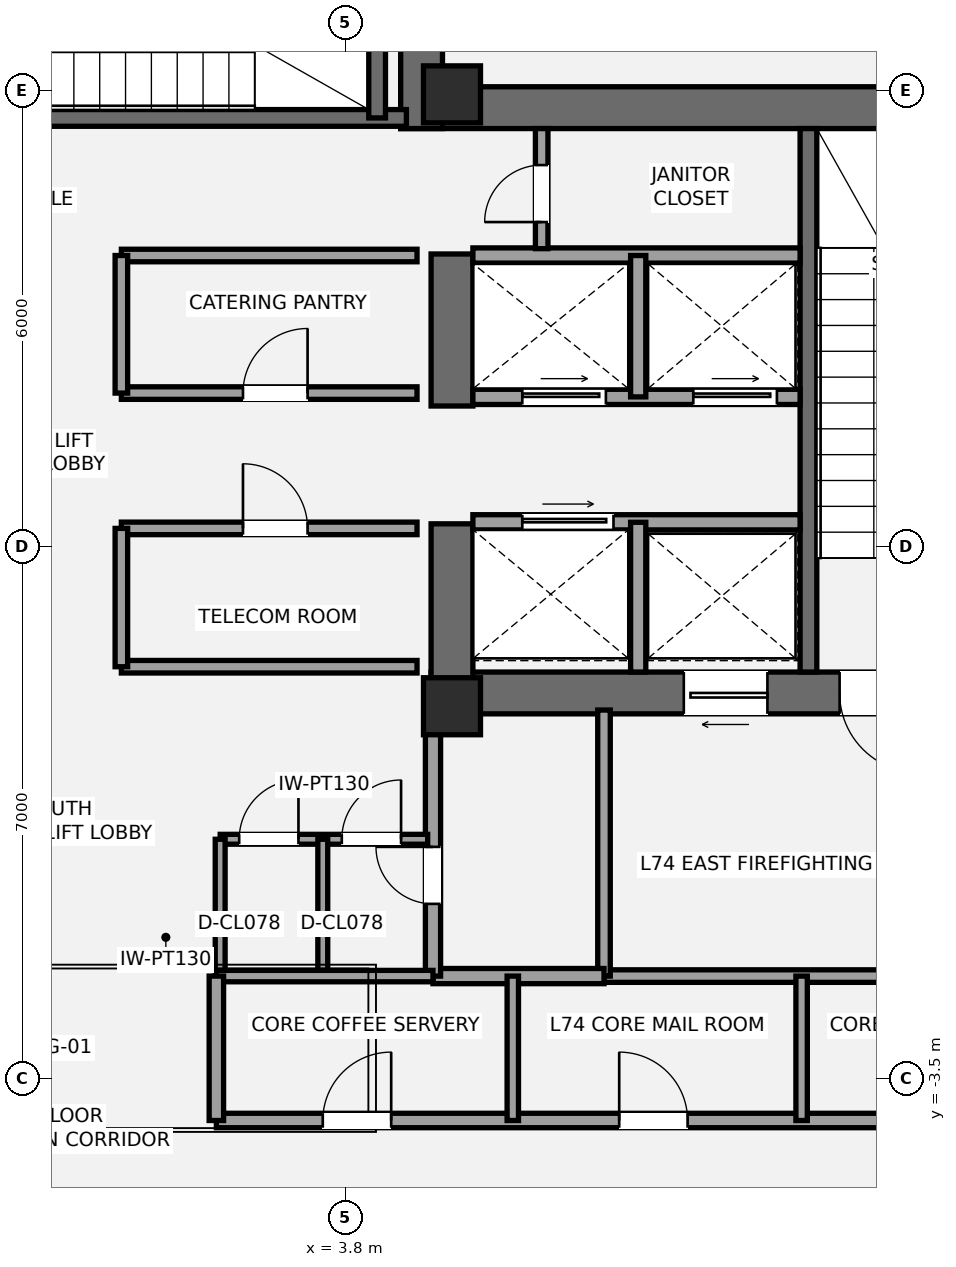
"""IFC4 building model, lengths in metres.
Left out: names, types, materials, properties, quantities, classifications, styles, units other than length and angle.
Written with IfcOpenShell. Run it as: python <this file> out.ifc"""

import sys

from ifc_helpers import new_model, si_unit, direction, frame, frame_2d, origin, origin_2d, place, context, subcontext, project, spatial, rectangle, extrude, element, fill, save


model = new_model("IFC4")
c1 = context("Model", 3, precision=1e-05, world=origin(), true_north=direction((0.0, 1.0)))
c2 = subcontext(c1, "Body", "Model", "MODEL_VIEW")
j1 = project(units=[si_unit("LENGTHUNIT", "METRE"), si_unit("PLANEANGLEUNIT", "RADIAN")], contexts=[c1])
p1 = place(None, origin())
s1 = spatial("IfcSite", under=j1, at=p1, CompositionType="ELEMENT")
p2 = place(p1, origin())
s2 = spatial("IfcBuilding", under=s1, at=p2, CompositionType="ELEMENT")
p3 = place(p2, frame((0.0, 0.0, 260.4)))
s3 = spatial("IfcBuildingStorey", under=s2, at=p3, CompositionType="ELEMENT", Elevation=260.4)
p4 = place(p3, frame((4.525, 9.275, 0.0), z_axis=(0.0, 0.0, 1.0), x_axis=(1.0, 0.0, 0.0)))
e1 = element("IfcWall", 1, at=p4, inside=s3, PredefinedType="SHEAR", context=c2, shape_type="SweptSolid", body=[
    extrude(rectangle(XDim=9.175, YDim=0.55, at=frame_2d((4.587, 0.0))), origin(), (0.0, 0.0, 1.0), 4.4),
])
p5 = place(p3, frame((13.7, 1.575, 0.0), z_axis=(0.0, 0.0, 1.0), x_axis=(-1.0, 0.0, 0.0)))
e2 = element("IfcWall", 2, at=p5, inside=s3, PredefinedType="SHEAR", context=c2, shape_type="SweptSolid", body=[
    extrude(rectangle(XDim=8.775, YDim=0.55, at=frame_2d((4.387, 0.0))), origin(), (0.0, 0.0, 1.0), 4.4),
])
p6 = place(p5, frame((2.35, 0.0, 0.0)))
e3 = element("IfcOpeningElement", 3, at=p6, cuts=e2, PredefinedType="OPENING", context=c2, shape_type="SweptSolid", body=[
    extrude(rectangle(XDim=1.05, YDim=2.15, at=frame_2d((0.525, 1.075))), frame((0.0, 0.285, 0.0), z_axis=(0.0, -1.0, 0.0), x_axis=(1.0, 0.0, 0.0)), (0.0, 0.0, 1.0), 0.57),
])
p7 = place(p5, frame((4.35, 0.0, 0.0)))
e4 = element("IfcOpeningElement", 4, at=p7, cuts=e2, PredefinedType="OPENING", context=c2, shape_type="SweptSolid", body=[
    extrude(rectangle(XDim=1.1, YDim=2.2, at=frame_2d((0.55, 1.1))), frame((0.0, 0.285, 0.0), z_axis=(0.0, -1.0, 0.0), x_axis=(1.0, 0.0, 0.0)), (0.0, 0.0, 1.0), 0.57),
])
p8 = place(p3, frame((5.2, 1.3, 0.0), z_axis=(0.0, 0.0, 1.0), x_axis=(0.0, 1.0, 0.0)))
e5 = element("IfcWall", 5, at=p8, inside=s3, PredefinedType="SHEAR", context=c2, shape_type="SweptSolid", body=[
    extrude(rectangle(XDim=2.5, YDim=0.55, at=frame_2d((1.25, 0.0))), origin(), (0.0, 0.0, 1.0), 4.4),
])
p9 = place(p3, frame((5.2, 5.35, 0.0), z_axis=(0.0, 0.0, 1.0), x_axis=(0.0, 1.0, 0.0)))
e6 = element("IfcWall", 6, at=p9, inside=s3, PredefinedType="SHEAR", context=c2, shape_type="SweptSolid", body=[
    extrude(rectangle(XDim=2.0, YDim=0.55, at=frame_2d((1.0, 0.0))), origin(), (0.0, 0.0, 1.0), 4.4),
])
p10 = place(p3, frame((9.89, 1.85, 0.0), z_axis=(0.0, 0.0, 1.0), x_axis=(0.0, 1.0, 0.0)))
e7 = element("IfcWall", 7, at=p10, inside=s3, PredefinedType="SHEAR", context=c2, shape_type="SweptSolid", body=[
    extrude(rectangle(XDim=7.15, YDim=0.22, at=frame_2d((3.575, 0.0))), origin(), (0.0, 0.0, 1.0), 4.4),
])
p11 = place(p3, frame((4.8, 9.0, 0.0), z_axis=(0.0, 0.0, 1.0), x_axis=(0.0, 1.0, 0.0)))
e8 = element("IfcWall", 8, at=p11, inside=s3, PredefinedType="SHEAR", context=c2, shape_type="SweptSolid", body=[
    extrude(rectangle(XDim=3.95, YDim=0.55, at=frame_2d((1.975, 0.0))), origin(), (0.0, 0.0, 1.0), 4.4),
])
p12 = place(p3, frame((-4.7, 9.14, 0.0), z_axis=(0.0, 0.0, 1.0), x_axis=(1.0, 0.0, 0.0)))
e9 = element("IfcWall", 9, at=p12, inside=s3, PredefinedType="SHEAR", context=c2, shape_type="SweptSolid", body=[
    extrude(rectangle(XDim=9.3, YDim=0.22, at=frame_2d((4.65, 0.0))), origin(), (0.0, 0.0, 1.0), 4.4),
])
p13 = place(p12, frame((1.15, 0.0, 0.0)))
e10 = element("IfcOpeningElement", 10, at=p13, cuts=e9, PredefinedType="OPENING", context=c2, shape_type="SweptSolid", body=[
    extrude(rectangle(XDim=1.05, YDim=2.15, at=frame_2d((0.525, 1.075))), frame((0.0, 0.12, 0.0), z_axis=(0.0, -1.0, 0.0), x_axis=(1.0, 0.0, 0.0)), (0.0, 0.0, 1.0), 0.24),
])
p14 = place(p3, frame((4.215, 9.14, 0.0), z_axis=(0.0, 0.0, 1.0), x_axis=(0.0, 1.0, 0.0)))
e11 = element("IfcWall", 11, at=p14, inside=s3, PredefinedType="SHEAR", context=c2, shape_type="SweptSolid", body=[
    extrude(rectangle(XDim=3.26, YDim=0.22, at=frame_2d((1.63, 0.0))), origin(), (0.0, 0.0, 1.0), 4.4),
])
for number, where, z_axis, x_axis in (
    (12, (5.2, 1.4, 0.0), (0.0, 0.0, 1.0), (1.0, 0.0, 0.0)),
    (13, (5.2, 9.45, 0.0), (0.0, 0.0, 1.0), (1.0, 0.0, 0.0)),
):
    element("IfcColumn", number, at=place(p3, frame(where, z_axis=z_axis, x_axis=x_axis)), inside=s3, PredefinedType="PILASTER", context=c2, shape_type="SweptSolid", body=[
        extrude(rectangle(XDim=0.75, YDim=0.75, at=origin_2d()), origin(), (0.0, 0.0, 1.0), 4.4),
    ])
p15 = place(p3, frame((7.2, -2.15, 0.0), z_axis=(0.0, 0.0, 1.0), x_axis=(1.0, 0.0, 0.0)))
e14 = element("IfcWall", 14, at=p15, inside=s3, PredefinedType="PARTITIONING", context=c2, shape_type="SweptSolid", body=[
    extrude(rectangle(XDim=6.25, YDim=0.165, at=frame_2d((3.125, 0.0))), origin(), (0.0, 0.0, 1.0), 2.37),
])
p16 = place(p3, frame((7.2, -2.15, 0.0), z_axis=(0.0, 0.0, 1.0), x_axis=(0.0, 1.0, 0.0)))
e15 = element("IfcWall", 15, at=p16, inside=s3, PredefinedType="PARTITIONING", context=c2, shape_type="SweptSolid", body=[
    extrude(rectangle(XDim=3.5, YDim=0.165, at=frame_2d((1.75, 0.0))), origin(), (0.0, 0.0, 1.0), 2.37),
])
p17 = place(p3, frame((4.95, -2.15, 0.0), z_axis=(0.0, 0.0, 1.0), x_axis=(1.0, 0.0, 0.0)))
e16 = element("IfcWall", 16, at=p17, inside=s3, PredefinedType="SOLIDWALL", context=c2, shape_type="SweptSolid", body=[
    extrude(rectangle(XDim=2.25, YDim=0.2, at=frame_2d((1.125, 0.0))), origin(), (0.0, 0.0, 1.0), 2.37),
])
p18 = place(p3, frame((4.95, -2.15, 0.0), z_axis=(0.0, 0.0, 1.0), x_axis=(0.0, 1.0, 0.0)))
e17 = element("IfcWall", 17, at=p18, inside=s3, PredefinedType="SOLIDWALL", context=c2, shape_type="SweptSolid", body=[
    extrude(rectangle(XDim=3.5, YDim=0.2, at=frame_2d((1.75, 0.0))), origin(), (0.0, 0.0, 1.0), 2.37),
])
p19 = place(p18, frame((0.95, 0.0, 0.0)))
e18 = element("IfcOpeningElement", 18, at=p19, cuts=e17, PredefinedType="OPENING", context=c2, shape_type="SweptSolid", body=[
    extrude(rectangle(XDim=0.75, YDim=2.1, at=frame_2d((0.375, 1.05))), frame((0.0, 0.11, 0.0), z_axis=(0.0, -1.0, 0.0), x_axis=(1.0, 0.0, 0.0)), (0.0, 0.0, 1.0), 0.22),
])
p20 = place(p3, frame((2.15, -0.35, 0.0), z_axis=(0.0, 0.0, 1.0), x_axis=(1.0, 0.0, 0.0)))
e19 = element("IfcWall", 19, at=p20, inside=s3, PredefinedType="PARTITIONING", context=c2, shape_type="SweptSolid", body=[
    extrude(rectangle(XDim=2.73, YDim=0.13, at=frame_2d((1.365, 0.0))), origin(), (0.0, 0.0, 1.0), 3.633),
])
p21 = place(p20, frame((0.25, 0.0, 0.0)))
e20 = element("IfcOpeningElement", 20, at=p21, cuts=e19, PredefinedType="OPENING", context=c2, shape_type="SweptSolid", body=[
    extrude(rectangle(XDim=0.78, YDim=2.1, at=frame_2d((0.39, 1.05))), frame((0.0, 0.075, 0.0), z_axis=(0.0, -1.0, 0.0), x_axis=(1.0, 0.0, 0.0)), (0.0, 0.0, 1.0), 0.15),
])
p22 = place(p20, frame((1.6, 0.0, 0.0)))
e21 = element("IfcOpeningElement", 21, at=p22, cuts=e19, PredefinedType="OPENING", context=c2, shape_type="SweptSolid", body=[
    extrude(rectangle(XDim=0.78, YDim=2.1, at=frame_2d((0.39, 1.05))), frame((0.0, 0.075, 0.0), z_axis=(0.0, -1.0, 0.0), x_axis=(1.0, 0.0, 0.0)), (0.0, 0.0, 1.0), 0.15),
])
for number, where, z_axis, x_axis in (
    (22, (2.15, -2.15, 0.0), (0.0, 0.0, 1.0), (0.0, 1.0, 0.0)),
    (23, (3.5, -2.15, 0.0), (0.0, 0.0, 1.0), (0.0, 1.0, 0.0)),
):
    element("IfcWall", number, at=place(p3, frame(where, z_axis=z_axis, x_axis=x_axis)), inside=s3, PredefinedType="PARTITIONING", context=c2, shape_type="SweptSolid", body=[
        extrude(rectangle(XDim=1.8, YDim=0.13, at=frame_2d((0.9, 0.0))), origin(), (0.0, 0.0, 1.0), 4.18),
    ])
p23 = place(p3, frame((5.475, 3.82, 0.0), z_axis=(0.0, 0.0, 1.0), x_axis=(1.0, 0.0, 0.0)))
e24 = element("IfcWall", 24, at=p23, inside=s3, PredefinedType="SOLIDWALL", context=c2, shape_type="SweptSolid", body=[
    extrude(rectangle(XDim=4.305, YDim=0.2, at=frame_2d((2.152, 0.0))), origin(), (0.0, 0.0, 1.0), 4.18),
])
p24 = place(p23, frame((0.65, 0.0, 0.0)))
e25 = element("IfcOpeningElement", 25, at=p24, cuts=e24, PredefinedType="OPENING", context=c2, shape_type="SweptSolid", body=[
    extrude(rectangle(XDim=1.2, YDim=2.2, at=frame_2d((0.6, 1.1))), frame((0.0, 0.11, 0.0), z_axis=(0.0, -1.0, 0.0), x_axis=(1.0, 0.0, 0.0)), (0.0, 0.0, 1.0), 0.22),
])
p25 = place(p3, frame((7.65, 1.85, 0.0), z_axis=(0.0, 0.0, 1.0), x_axis=(0.0, 1.0, 0.0)))
e26 = element("IfcWall", 26, at=p25, inside=s3, PredefinedType="SOLIDWALL", context=c2, shape_type="SweptSolid", body=[
    extrude(rectangle(XDim=1.97, YDim=0.2, at=frame_2d((0.985, 0.0))), origin(), (0.0, 0.0, 1.0), 4.18),
])
p26 = place(p3, frame((5.475, 5.47, 0.0), z_axis=(0.0, 0.0, 1.0), x_axis=(1.0, 0.0, 0.0)))
e27 = element("IfcWall", 27, at=p26, inside=s3, PredefinedType="SOLIDWALL", context=c2, shape_type="SweptSolid", body=[
    extrude(rectangle(XDim=4.305, YDim=0.2, at=frame_2d((2.152, 0.0))), origin(), (0.0, 0.0, 1.0), 4.18),
])
p27 = place(p26, frame((0.65, 0.0, 0.0)))
e28 = element("IfcOpeningElement", 28, at=p27, cuts=e27, PredefinedType="OPENING", context=c2, shape_type="SweptSolid", body=[
    extrude(rectangle(XDim=1.1, YDim=2.2, at=frame_2d((0.55, 1.1))), frame((0.0, 0.11, 0.0), z_axis=(0.0, -1.0, 0.0), x_axis=(1.0, 0.0, 0.0)), (0.0, 0.0, 1.0), 0.22),
])
p28 = place(p26, frame((2.9, 0.0, 0.0)))
e29 = element("IfcOpeningElement", 29, at=p28, cuts=e27, PredefinedType="OPENING", context=c2, shape_type="SweptSolid", body=[
    extrude(rectangle(XDim=1.1, YDim=2.2, at=frame_2d((0.55, 1.1))), frame((0.0, 0.11, 0.0), z_axis=(0.0, -1.0, 0.0), x_axis=(1.0, 0.0, 0.0)), (0.0, 0.0, 1.0), 0.22),
])
p29 = place(p3, frame((5.475, 7.33, 0.0), z_axis=(0.0, 0.0, 1.0), x_axis=(1.0, 0.0, 0.0)))
e30 = element("IfcWall", 30, at=p29, inside=s3, PredefinedType="SOLIDWALL", context=c2, shape_type="SweptSolid", body=[
    extrude(rectangle(XDim=4.305, YDim=0.2, at=frame_2d((2.152, 0.0))), origin(), (0.0, 0.0, 1.0), 4.18),
])
p30 = place(p3, frame((7.65, 5.47, 0.0), z_axis=(0.0, 0.0, 1.0), x_axis=(0.0, 1.0, 0.0)))
e31 = element("IfcWall", 31, at=p30, inside=s3, PredefinedType="SOLIDWALL", context=c2, shape_type="SweptSolid", body=[
    extrude(rectangle(XDim=1.86, YDim=0.2, at=frame_2d((0.93, 0.0))), origin(), (0.0, 0.0, 1.0), 4.18),
])
p31 = place(p3, frame((0.85, 1.92, 0.0), z_axis=(0.0, 0.0, 1.0), x_axis=(1.0, 0.0, 0.0)))
e32 = element("IfcWall", 32, at=p31, inside=s3, PredefinedType="PARTITIONING", context=c2, shape_type="SweptSolid", body=[
    extrude(rectangle(XDim=3.89, YDim=0.165, at=frame_2d((1.945, 0.0))), origin(), (0.0, 0.0, 1.0), 3.32),
])
p32 = place(p3, frame((0.85, 3.74, 0.0), z_axis=(0.0, 0.0, 1.0), x_axis=(1.0, 0.0, 0.0)))
e33 = element("IfcWall", 33, at=p32, inside=s3, PredefinedType="PARTITIONING", context=c2, shape_type="SweptSolid", body=[
    extrude(rectangle(XDim=3.89, YDim=0.165, at=frame_2d((1.945, 0.0))), origin(), (0.0, 0.0, 1.0), 4.18),
])
p33 = place(p32, frame((1.6, 0.0, 0.0)))
e34 = element("IfcOpeningElement", 34, at=p33, cuts=e33, PredefinedType="OPENING", context=c2, shape_type="SweptSolid", body=[
    extrude(rectangle(XDim=0.85, YDim=2.1, at=frame_2d((0.425, 1.05))), frame((0.0, 0.093, 0.0), z_axis=(0.0, -1.0, 0.0), x_axis=(1.0, 0.0, 0.0)), (0.0, 0.0, 1.0), 0.185),
])
p34 = place(p3, frame((0.85, 1.92, 0.0), z_axis=(0.0, 0.0, 1.0), x_axis=(0.0, 1.0, 0.0)))
e35 = element("IfcWall", 35, at=p34, inside=s3, PredefinedType="PARTITIONING", context=c2, shape_type="SweptSolid", body=[
    extrude(rectangle(XDim=1.82, YDim=0.165, at=frame_2d((0.91, 0.0))), origin(), (0.0, 0.0, 1.0), 4.18),
])
p35 = place(p3, frame((0.85, 5.52, 0.0), z_axis=(0.0, 0.0, 1.0), x_axis=(1.0, 0.0, 0.0)))
e36 = element("IfcWall", 36, at=p35, inside=s3, PredefinedType="PARTITIONING", context=c2, shape_type="SweptSolid", body=[
    extrude(rectangle(XDim=3.89, YDim=0.165, at=frame_2d((1.945, 0.0))), origin(), (0.0, 0.0, 1.0), 4.18),
])
p36 = place(p35, frame((1.6, 0.0, 0.0)))
e37 = element("IfcOpeningElement", 37, at=p36, cuts=e36, PredefinedType="OPENING", context=c2, shape_type="SweptSolid", body=[
    extrude(rectangle(XDim=0.85, YDim=2.1, at=frame_2d((0.425, 1.05))), frame((0.0, 0.093, 0.0), z_axis=(0.0, -1.0, 0.0), x_axis=(1.0, 0.0, 0.0)), (0.0, 0.0, 1.0), 0.185),
])
p37 = place(p3, frame((0.85, 7.33, 0.0), z_axis=(0.0, 0.0, 1.0), x_axis=(1.0, 0.0, 0.0)))
e38 = element("IfcWall", 38, at=p37, inside=s3, PredefinedType="PARTITIONING", context=c2, shape_type="SweptSolid", body=[
    extrude(rectangle(XDim=3.89, YDim=0.165, at=frame_2d((1.945, 0.0))), origin(), (0.0, 0.0, 1.0), 4.18),
])
p38 = place(p3, frame((0.85, 5.52, 0.0), z_axis=(0.0, 0.0, 1.0), x_axis=(0.0, 1.0, 0.0)))
e39 = element("IfcWall", 39, at=p38, inside=s3, PredefinedType="PARTITIONING", context=c2, shape_type="SweptSolid", body=[
    extrude(rectangle(XDim=1.81, YDim=0.165, at=frame_2d((0.905, 0.0))), origin(), (0.0, 0.0, 1.0), 4.18),
])
p39 = place(p3, frame((6.38, 7.42, 0.0), z_axis=(0.0, 0.0, 1.0), x_axis=(0.0, 1.0, 0.0)))
e40 = element("IfcWall", 40, at=p39, inside=s3, PredefinedType="PARTITIONING", context=c2, shape_type="SweptSolid", body=[
    extrude(rectangle(XDim=1.58, YDim=0.165, at=frame_2d((0.79, 0.0))), origin(), (0.0, 0.0, 1.0), 4.18),
])
p40 = place(p39, frame((0.35, 0.0, 0.0)))
e41 = element("IfcOpeningElement", 41, at=p40, cuts=e40, PredefinedType="OPENING", context=c2, shape_type="SweptSolid", body=[
    extrude(rectangle(XDim=0.75, YDim=2.1, at=frame_2d((0.375, 1.05))), frame((0.0, 0.093, 0.0), z_axis=(0.0, -1.0, 0.0), x_axis=(1.0, 0.0, 0.0)), (0.0, 0.0, 1.0), 0.185),
])
p41 = place(p3, frame((2.1, -4.05, 0.0), z_axis=(0.0, 0.0, 1.0), x_axis=(1.0, 0.0, 0.0)))
e42 = element("IfcWall", 42, at=p41, inside=s3, PredefinedType="PLUMBINGWALL", context=c2, shape_type="SweptSolid", body=[
    extrude(rectangle(XDim=11.35, YDim=0.19, at=frame_2d((5.675, 0.0))), origin(), (0.0, 0.0, 1.0), 2.37),
])
p42 = place(p41, frame((1.4, 0.0, 0.0)))
e43 = element("IfcOpeningElement", 43, at=p42, cuts=e42, PredefinedType="OPENING", context=c2, shape_type="SweptSolid", body=[
    extrude(rectangle(XDim=0.9, YDim=2.1, at=frame_2d((0.45, 1.05))), frame((0.0, 0.105, 0.0), z_axis=(0.0, -1.0, 0.0), x_axis=(1.0, 0.0, 0.0)), (0.0, 0.0, 1.0), 0.21),
])
p43 = place(p41, frame((5.3, 0.0, 0.0)))
e44 = element("IfcOpeningElement", 44, at=p43, cuts=e42, PredefinedType="OPENING", context=c2, shape_type="SweptSolid", body=[
    extrude(rectangle(XDim=0.9, YDim=2.1, at=frame_2d((0.45, 1.05))), frame((0.0, 0.105, 0.0), z_axis=(0.0, -1.0, 0.0), x_axis=(1.0, 0.0, 0.0)), (0.0, 0.0, 1.0), 0.21),
])
p44 = place(p41, frame((9.1, 0.0, 0.0)))
e45 = element("IfcOpeningElement", 45, at=p44, cuts=e42, PredefinedType="OPENING", context=c2, shape_type="SweptSolid", body=[
    extrude(rectangle(XDim=0.9, YDim=2.1, at=frame_2d((0.45, 1.05))), frame((0.0, 0.105, 0.0), z_axis=(0.0, -1.0, 0.0), x_axis=(1.0, 0.0, 0.0)), (0.0, 0.0, 1.0), 0.21),
])
p45 = place(p3, frame((2.1, -2.15, 0.0), z_axis=(0.0, 0.0, 1.0), x_axis=(1.0, 0.0, 0.0)))
e46 = element("IfcWall", 46, at=p45, inside=s3, PredefinedType="PLUMBINGWALL", context=c2, shape_type="SweptSolid", body=[
    extrude(rectangle(XDim=2.85, YDim=0.15, at=frame_2d((1.425, 0.0))), origin(), (0.0, 0.0, 1.0), 4.18),
])
p46 = place(p3, frame((2.1, -4.05, 0.0), z_axis=(0.0, 0.0, 1.0), x_axis=(0.0, 1.0, 0.0)))
e47 = element("IfcWall", 47, at=p46, inside=s3, PredefinedType="PLUMBINGWALL", context=c2, shape_type="SweptSolid", body=[
    extrude(rectangle(XDim=1.9, YDim=0.19, at=frame_2d((0.95, 0.0))), origin(), (0.0, 0.0, 1.0), 4.18),
])
p47 = place(p3, frame((6.0, -4.05, 0.0), z_axis=(0.0, 0.0, 1.0), x_axis=(0.0, 1.0, 0.0)))
e48 = element("IfcWall", 48, at=p47, inside=s3, PredefinedType="PLUMBINGWALL", context=c2, shape_type="SweptSolid", body=[
    extrude(rectangle(XDim=1.9, YDim=0.15, at=frame_2d((0.95, 0.0))), origin(), (0.0, 0.0, 1.0), 2.37),
])
p48 = place(p3, frame((9.8, -4.05, 0.0), z_axis=(0.0, 0.0, 1.0), x_axis=(0.0, 1.0, 0.0)))
e49 = element("IfcWall", 49, at=p48, inside=s3, PredefinedType="PLUMBINGWALL", context=c2, shape_type="SweptSolid", body=[
    extrude(rectangle(XDim=1.9, YDim=0.15, at=frame_2d((0.95, 0.0))), origin(), (0.0, 0.0, 1.0), 3.633),
])
p49 = place(p6, origin())
e50 = element("IfcDoor", 50, at=p49, inside=s3, OperationType="SINGLE_SWING_LEFT", PredefinedType="DOOR", context=c2, shape_type="SweptSolid", body=[
    extrude(rectangle(XDim=1.05, YDim=2.15, at=frame_2d((0.525, 1.075))), frame((0.0, 0.025, 0.0), z_axis=(0.0, -1.0, 0.0), x_axis=(1.0, 0.0, 0.0)), (0.0, 0.0, 1.0), 0.05),
])
fill(e3, e50)
p50 = place(p19, origin())
e51 = element("IfcDoor", 51, at=p50, inside=s3, OperationType="SINGLE_SWING_RIGHT", PredefinedType="DOOR", context=c2, shape_type="SweptSolid", body=[
    extrude(rectangle(XDim=0.75, YDim=2.1, at=frame_2d((0.375, 1.05))), frame((0.0, 0.025, 0.0), z_axis=(0.0, -1.0, 0.0), x_axis=(1.0, 0.0, 0.0)), (0.0, 0.0, 1.0), 0.05),
])
fill(e18, e51)
p51 = place(p21, origin())
e52 = element("IfcDoor", 52, at=p51, inside=s3, OperationType="SINGLE_SWING_RIGHT", PredefinedType="DOOR", context=c2, shape_type="SweptSolid", body=[
    extrude(rectangle(XDim=0.78, YDim=2.1, at=frame_2d((0.39, 1.05))), frame((0.0, 0.025, 0.0), z_axis=(0.0, -1.0, 0.0), x_axis=(1.0, 0.0, 0.0)), (0.0, 0.0, 1.0), 0.05),
])
fill(e20, e52)
p52 = place(p22, origin())
e53 = element("IfcDoor", 53, at=p52, inside=s3, OperationType="SINGLE_SWING_RIGHT", PredefinedType="DOOR", context=c2, shape_type="SweptSolid", body=[
    extrude(rectangle(XDim=0.78, YDim=2.1, at=frame_2d((0.39, 1.05))), frame((0.0, 0.025, 0.0), z_axis=(0.0, -1.0, 0.0), x_axis=(1.0, 0.0, 0.0)), (0.0, 0.0, 1.0), 0.05),
])
fill(e21, e53)
p53 = place(p7, origin())
e54 = element("IfcDoor", 54, at=p53, inside=s3, OperationType="SLIDING_TO_LEFT", PredefinedType="DOOR", context=c2, shape_type="SweptSolid", body=[
    extrude(rectangle(XDim=1.1, YDim=2.2, at=frame_2d((0.55, 1.1))), frame((0.0, 0.025, 0.0), z_axis=(0.0, -1.0, 0.0), x_axis=(1.0, 0.0, 0.0)), (0.0, 0.0, 1.0), 0.05),
])
fill(e4, e54)
p54 = place(p24, origin())
e55 = element("IfcDoor", 55, at=p54, inside=s3, OperationType="SLIDING_TO_RIGHT", PredefinedType="DOOR", context=c2, shape_type="SweptSolid", body=[
    extrude(rectangle(XDim=1.2, YDim=2.2, at=frame_2d((0.6, 1.1))), frame((0.0, 0.025, 0.0), z_axis=(0.0, -1.0, 0.0), x_axis=(1.0, 0.0, 0.0)), (0.0, 0.0, 1.0), 0.05),
])
fill(e25, e55)
p55 = place(p27, origin())
e56 = element("IfcDoor", 56, at=p55, inside=s3, OperationType="SLIDING_TO_LEFT", PredefinedType="DOOR", context=c2, shape_type="SweptSolid", body=[
    extrude(rectangle(XDim=1.1, YDim=2.2, at=frame_2d((0.55, 1.1))), frame((0.0, 0.025, 0.0), z_axis=(0.0, -1.0, 0.0), x_axis=(1.0, 0.0, 0.0)), (0.0, 0.0, 1.0), 0.05),
])
fill(e28, e56)
p56 = place(p28, origin())
e57 = element("IfcDoor", 57, at=p56, inside=s3, OperationType="SLIDING_TO_LEFT", PredefinedType="DOOR", context=c2, shape_type="SweptSolid", body=[
    extrude(rectangle(XDim=1.1, YDim=2.2, at=frame_2d((0.55, 1.1))), frame((0.0, 0.025, 0.0), z_axis=(0.0, -1.0, 0.0), x_axis=(1.0, 0.0, 0.0)), (0.0, 0.0, 1.0), 0.05),
])
fill(e29, e57)
p57 = place(p33, origin())
e58 = element("IfcDoor", 58, at=p57, inside=s3, OperationType="SINGLE_SWING_LEFT", PredefinedType="DOOR", context=c2, shape_type="SweptSolid", body=[
    extrude(rectangle(XDim=0.85, YDim=2.1, at=frame_2d((0.425, 1.05))), frame((0.0, 0.025, 0.0), z_axis=(0.0, -1.0, 0.0), x_axis=(1.0, 0.0, 0.0)), (0.0, 0.0, 1.0), 0.05),
])
fill(e34, e58)
p58 = place(p36, origin())
e59 = element("IfcDoor", 59, at=p58, inside=s3, OperationType="SINGLE_SWING_RIGHT", PredefinedType="DOOR", context=c2, shape_type="SweptSolid", body=[
    extrude(rectangle(XDim=0.85, YDim=2.1, at=frame_2d((0.425, 1.05))), frame((0.0, 0.025, 0.0), z_axis=(0.0, -1.0, 0.0), x_axis=(1.0, 0.0, 0.0)), (0.0, 0.0, 1.0), 0.05),
])
fill(e37, e59)
p59 = place(p40, origin())
e60 = element("IfcDoor", 60, at=p59, inside=s3, OperationType="SINGLE_SWING_LEFT", PredefinedType="DOOR", context=c2, shape_type="SweptSolid", body=[
    extrude(rectangle(XDim=0.75, YDim=2.1, at=frame_2d((0.375, 1.05))), frame((0.0, 0.025, 0.0), z_axis=(0.0, -1.0, 0.0), x_axis=(1.0, 0.0, 0.0)), (0.0, 0.0, 1.0), 0.05),
])
fill(e41, e60)
p60 = place(p42, origin())
e61 = element("IfcDoor", 61, at=p60, inside=s3, OperationType="SINGLE_SWING_RIGHT", PredefinedType="DOOR", context=c2, shape_type="SweptSolid", body=[
    extrude(rectangle(XDim=0.9, YDim=2.1, at=frame_2d((0.45, 1.05))), frame((0.0, 0.025, 0.0), z_axis=(0.0, -1.0, 0.0), x_axis=(1.0, 0.0, 0.0)), (0.0, 0.0, 1.0), 0.05),
])
fill(e43, e61)
p61 = place(p43, origin())
e62 = element("IfcDoor", 62, at=p61, inside=s3, OperationType="SINGLE_SWING_LEFT", PredefinedType="DOOR", context=c2, shape_type="SweptSolid", body=[
    extrude(rectangle(XDim=0.9, YDim=2.1, at=frame_2d((0.45, 1.05))), frame((0.0, 0.025, 0.0), z_axis=(0.0, -1.0, 0.0), x_axis=(1.0, 0.0, 0.0)), (0.0, 0.0, 1.0), 0.05),
])
fill(e44, e62)
save(model, sys.argv[1])
